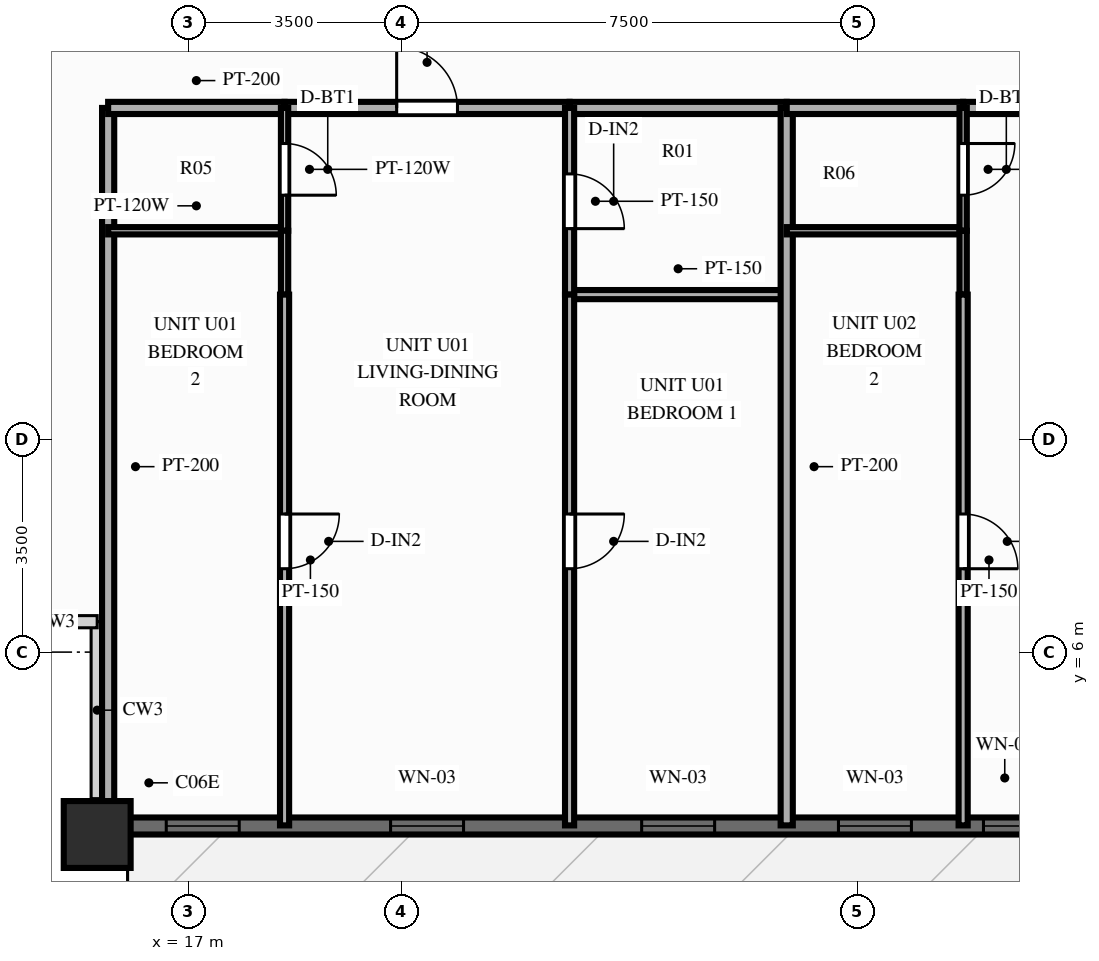
"""IFC4 building model, lengths in metres.
Left out: names, types, materials, properties, quantities, classifications, styles, units other than length and angle.
Written with IfcOpenShell. Run it as: python <this file> out.ifc"""

import sys

from ifc_helpers import new_model, si_unit, direction, frame, frame_2d, origin, origin_2d, place, context, subcontext, project, spatial, rectangle, extrude, source, transform, mapped, element, fill, save


model = new_model("IFC4")
c1 = context("Model", 3, precision=1e-05, world=origin(), true_north=direction((0.0, 1.0)))
c2 = subcontext(c1, "Body", "Model", "MODEL_VIEW")
j1 = project(units=[si_unit("LENGTHUNIT", "METRE"), si_unit("PLANEANGLEUNIT", "RADIAN")], contexts=[c1])
p1 = place(None, origin())
s1 = spatial("IfcSite", under=j1, at=p1, CompositionType="ELEMENT")
p2 = place(p1, origin())
s2 = spatial("IfcBuilding", under=s1, at=p2, CompositionType="ELEMENT")
p3 = place(p2, frame((0.0, 0.0, 43.4)))
s3 = spatial("IfcBuildingStorey", under=s2, at=p3, CompositionType="ELEMENT", Elevation=43.4)
m1 = source(origin(), c2, "Body", "SweptSolid", [
    extrude(rectangle(XDim=1.1, YDim=1.1, at=origin_2d()), origin(), (0.0, 0.0, 1.0), 3.0),
])
p4 = place(p3, frame((15.5, 3.0, 0.0), z_axis=(0.0, 0.0, 1.0), x_axis=(1.0, 0.0, 0.0)))
e1 = element("IfcColumn", 1, at=p4, inside=s3, PredefinedType="COLUMN", context=c2, shape_type="MappedRepresentation", body=[
    mapped(m1, transform((0.0, 0.0, 0.0), scale=1.0)),
])
p5 = place(p3, frame((15.5, 3.14, 0.0), z_axis=(0.0, 0.0, 1.0), x_axis=(1.0, 0.0, 0.0)))
e2 = element("IfcWall", 2, at=p5, inside=s3, PredefinedType="SOLIDWALL", context=c2, shape_type="SweptSolid", body=[
    extrude(rectangle(XDim=45.0, YDim=0.28, at=frame_2d((22.5, 0.0))), origin(), (0.0, 0.0, 1.0), 2.28),
])
p6 = place(p5, frame((1.136, 0.0, 0.25)))
e3 = element("IfcOpeningElement", 3, at=p6, cuts=e2, PredefinedType="OPENING", context=c2, shape_type="SweptSolid", body=[
    extrude(rectangle(XDim=1.2, YDim=1.5, at=frame_2d((0.6, 0.75))), frame((0.0, 0.152, 0.0), z_axis=(0.0, -1.0, 0.0), x_axis=(1.0, 0.0, 0.0)), (0.0, 0.0, 1.0), 0.304),
])
p7 = place(p5, frame((4.825, 0.0, 0.25)))
e4 = element("IfcOpeningElement", 4, at=p7, cuts=e2, PredefinedType="OPENING", context=c2, shape_type="SweptSolid", body=[
    extrude(rectangle(XDim=1.2, YDim=1.5, at=frame_2d((0.6, 0.75))), frame((0.0, 0.152, 0.0), z_axis=(0.0, -1.0, 0.0), x_axis=(1.0, 0.0, 0.0)), (0.0, 0.0, 1.0), 0.304),
])
p8 = place(p5, frame((8.954, 0.0, 0.25)))
e5 = element("IfcOpeningElement", 5, at=p8, cuts=e2, PredefinedType="OPENING", context=c2, shape_type="SweptSolid", body=[
    extrude(rectangle(XDim=1.2, YDim=1.5, at=frame_2d((0.6, 0.75))), frame((0.0, 0.152, 0.0), z_axis=(0.0, -1.0, 0.0), x_axis=(1.0, 0.0, 0.0)), (0.0, 0.0, 1.0), 0.304),
])
p9 = place(p5, frame((12.191, 0.0, 0.25)))
e6 = element("IfcOpeningElement", 6, at=p9, cuts=e2, PredefinedType="OPENING", context=c2, shape_type="SweptSolid", body=[
    extrude(rectangle(XDim=1.2, YDim=1.5, at=frame_2d((0.6, 0.75))), frame((0.0, 0.152, 0.0), z_axis=(0.0, -1.0, 0.0), x_axis=(1.0, 0.0, 0.0)), (0.0, 0.0, 1.0), 0.304),
])
p10 = place(p5, frame((14.576, 0.0, 0.25)))
e7 = element("IfcOpeningElement", 7, at=p10, cuts=e2, PredefinedType="OPENING", context=c2, shape_type="SweptSolid", body=[
    extrude(rectangle(XDim=0.7, YDim=1.5, at=frame_2d((0.35, 0.75))), frame((0.0, 0.152, 0.0), z_axis=(0.0, -1.0, 0.0), x_axis=(1.0, 0.0, 0.0)), (0.0, 0.0, 1.0), 0.304),
])
p11 = place(p5, frame((17.059, 0.0, 0.25)))
e8 = element("IfcOpeningElement", 8, at=p11, cuts=e2, PredefinedType="OPENING", context=c2, shape_type="SweptSolid", body=[
    extrude(rectangle(XDim=1.2, YDim=1.5, at=frame_2d((0.6, 0.75))), frame((0.0, 0.152, 0.0), z_axis=(0.0, -1.0, 0.0), x_axis=(1.0, 0.0, 0.0)), (0.0, 0.0, 1.0), 0.304),
])
p12 = place(p5, frame((21.264, 0.0, 0.0), z_axis=(0.0, 0.0, 1.0), x_axis=(-1.0, 0.0, 0.0)))
e9 = element("IfcOpeningElement", 9, at=p12, cuts=e2, PredefinedType="OPENING", context=c2, shape_type="SweptSolid", body=[
    extrude(rectangle(XDim=1.1, YDim=2.15, at=frame_2d((0.55, 1.075))), frame((0.0, 0.152, 0.0), z_axis=(0.0, -1.0, 0.0), x_axis=(1.0, 0.0, 0.0)), (0.0, 0.0, 1.0), 0.304),
])
p13 = place(p5, frame((23.351, 0.0, 0.25)))
e10 = element("IfcOpeningElement", 10, at=p13, cuts=e2, PredefinedType="OPENING", context=c2, shape_type="SweptSolid", body=[
    extrude(rectangle(XDim=1.2, YDim=1.5, at=frame_2d((0.6, 0.75))), frame((0.0, 0.152, 0.0), z_axis=(0.0, -1.0, 0.0), x_axis=(1.0, 0.0, 0.0)), (0.0, 0.0, 1.0), 0.304),
])
p14 = place(p5, frame((26.406, 0.0, 0.25)))
e11 = element("IfcOpeningElement", 11, at=p14, cuts=e2, PredefinedType="OPENING", context=c2, shape_type="SweptSolid", body=[
    extrude(rectangle(XDim=1.2, YDim=1.5, at=frame_2d((0.6, 0.75))), frame((0.0, 0.152, 0.0), z_axis=(0.0, -1.0, 0.0), x_axis=(1.0, 0.0, 0.0)), (0.0, 0.0, 1.0), 0.304),
])
p15 = place(p5, frame((31.39, 0.0, 0.25)))
e12 = element("IfcOpeningElement", 12, at=p15, cuts=e2, PredefinedType="OPENING", context=c2, shape_type="SweptSolid", body=[
    extrude(rectangle(XDim=1.2, YDim=1.5, at=frame_2d((0.6, 0.75))), frame((0.0, 0.152, 0.0), z_axis=(0.0, -1.0, 0.0), x_axis=(1.0, 0.0, 0.0)), (0.0, 0.0, 1.0), 0.304),
])
p16 = place(p5, frame((34.511, 0.0, 0.25)))
e13 = element("IfcOpeningElement", 13, at=p16, cuts=e2, PredefinedType="OPENING", context=c2, shape_type="SweptSolid", body=[
    extrude(rectangle(XDim=1.2, YDim=1.5, at=frame_2d((0.6, 0.75))), frame((0.0, 0.152, 0.0), z_axis=(0.0, -1.0, 0.0), x_axis=(1.0, 0.0, 0.0)), (0.0, 0.0, 1.0), 0.304),
])
p17 = place(p5, frame((38.305, 0.0, 0.25)))
e14 = element("IfcOpeningElement", 14, at=p17, cuts=e2, PredefinedType="OPENING", context=c2, shape_type="SweptSolid", body=[
    extrude(rectangle(XDim=1.2, YDim=1.5, at=frame_2d((0.6, 0.75))), frame((0.0, 0.152, 0.0), z_axis=(0.0, -1.0, 0.0), x_axis=(1.0, 0.0, 0.0)), (0.0, 0.0, 1.0), 0.304),
])
p18 = place(p5, frame((42.329, 0.0, 0.25)))
e15 = element("IfcOpeningElement", 15, at=p18, cuts=e2, PredefinedType="OPENING", context=c2, shape_type="SweptSolid", body=[
    extrude(rectangle(XDim=1.2, YDim=1.5, at=frame_2d((0.6, 0.75))), frame((0.0, 0.152, 0.0), z_axis=(0.0, -1.0, 0.0), x_axis=(1.0, 0.0, 0.0)), (0.0, 0.0, 1.0), 0.304),
])
p19 = place(p3, frame((15.68, 14.95, 0.0), z_axis=(0.0, 0.0, 1.0), x_axis=(0.0, -1.0, 0.0)))
e16 = element("IfcWall", 16, at=p19, inside=s3, PredefinedType="PARTITIONING", context=c2, shape_type="SweptSolid", body=[
    extrude(rectangle(XDim=11.8, YDim=0.2, at=frame_2d((5.9, 0.0))), origin(), (0.0, 0.0, 1.0), 2.79),
])
p20 = place(p3, frame((15.68, 14.95, 0.0), z_axis=(0.0, 0.0, 1.0), x_axis=(1.0, 0.0, 0.0)))
e17 = element("IfcWall", 17, at=p20, inside=s3, PredefinedType="PARTITIONING", context=c2, shape_type="SweptSolid", body=[
    extrude(rectangle(XDim=2.902, YDim=0.2, at=frame_2d((1.451, 0.0))), origin(), (0.0, 0.0, 1.0), 2.79),
])
p21 = place(p3, frame((18.582, 14.95, 0.0), z_axis=(0.0, 0.0, 1.0), x_axis=(1.0, 0.0, 0.0)))
e18 = element("IfcWall", 18, at=p21, inside=s3, PredefinedType="PARTITIONING", context=c2, shape_type="SweptSolid", body=[
    extrude(rectangle(XDim=4.687, YDim=0.2, at=frame_2d((2.344, 0.0))), origin(), (0.0, 0.0, 1.0), 2.79),
])
p22 = place(p21, frame((1.844, 0.0, 0.0)))
e19 = element("IfcOpeningElement", 19, at=p22, cuts=e18, PredefinedType="OPENING", context=c2, shape_type="SweptSolid", body=[
    extrude(rectangle(XDim=1.0, YDim=2.15, at=frame_2d((0.5, 1.075))), frame((0.0, 0.112, 0.0), z_axis=(0.0, -1.0, 0.0), x_axis=(1.0, 0.0, 0.0)), (0.0, 0.0, 1.0), 0.224),
])
p23 = place(p3, frame((23.269, 14.95, 0.0), z_axis=(0.0, 0.0, 1.0), x_axis=(1.0, 0.0, 0.0)))
e20 = element("IfcWall", 20, at=p23, inside=s3, PredefinedType="PARTITIONING", context=c2, shape_type="SweptSolid", body=[
    extrude(rectangle(XDim=3.571, YDim=0.2, at=frame_2d((1.786, 0.0))), origin(), (0.0, 0.0, 1.0), 2.79),
])
p24 = place(p3, frame((15.68, 12.93, 0.0), z_axis=(0.0, 0.0, 1.0), x_axis=(1.0, 0.0, 0.0)))
e21 = element("IfcWall", 21, at=p24, inside=s3, PredefinedType="PARTITIONING", context=c2, shape_type="SweptSolid", body=[
    extrude(rectangle(XDim=2.902, YDim=0.12, at=frame_2d((1.451, 0.0))), origin(), (0.0, 0.0, 1.0), 2.79),
])
p25 = place(p3, frame((23.269, 11.88, 0.0), z_axis=(0.0, 0.0, 1.0), x_axis=(1.0, 0.0, 0.0)))
e22 = element("IfcWall", 22, at=p25, inside=s3, PredefinedType="PARTITIONING", context=c2, shape_type="SweptSolid", body=[
    extrude(rectangle(XDim=3.571, YDim=0.15, at=frame_2d((1.786, 0.0))), origin(), (0.0, 0.0, 1.0), 2.79),
])
p26 = place(p3, frame((18.582, 14.95, 0.0), z_axis=(0.0, 0.0, 1.0), x_axis=(0.0, -1.0, 0.0)))
e23 = element("IfcWall", 23, at=p26, inside=s3, PredefinedType="PARTITIONING", context=c2, shape_type="SweptSolid", body=[
    extrude(rectangle(XDim=2.02, YDim=0.12, at=frame_2d((1.01, 0.0))), origin(), (0.0, 0.0, 1.0), 2.79),
])
p27 = place(p26, frame((0.585, 0.0, 0.0)))
e24 = element("IfcOpeningElement", 24, at=p27, cuts=e23, PredefinedType="OPENING", context=c2, shape_type="SweptSolid", body=[
    extrude(rectangle(XDim=0.85, YDim=2.05, at=frame_2d((0.425, 1.025))), frame((0.0, 0.072, 0.0), z_axis=(0.0, -1.0, 0.0), x_axis=(1.0, 0.0, 0.0)), (0.0, 0.0, 1.0), 0.144),
])
p28 = place(p3, frame((18.582, 12.93, 0.0), z_axis=(0.0, 0.0, 1.0), x_axis=(0.0, -1.0, 0.0)))
e25 = element("IfcWall", 25, at=p28, inside=s3, PredefinedType="PARTITIONING", context=c2, shape_type="SweptSolid", body=[
    extrude(rectangle(XDim=1.05, YDim=0.12, at=frame_2d((0.525, 0.0))), origin(), (0.0, 0.0, 1.0), 2.79),
])
p29 = place(p3, frame((18.582, 11.88, 0.0), z_axis=(0.0, 0.0, 1.0), x_axis=(0.0, -1.0, 0.0)))
e26 = element("IfcWall", 26, at=p29, inside=s3, PredefinedType="PARTITIONING", context=c2, shape_type="SweptSolid", body=[
    extrude(rectangle(XDim=8.73, YDim=0.15, at=frame_2d((4.365, 0.0))), origin(), (0.0, 0.0, 1.0), 2.79),
])
p30 = place(p29, frame((3.609, 0.0, 0.0)))
e27 = element("IfcOpeningElement", 27, at=p30, cuts=e26, PredefinedType="OPENING", context=c2, shape_type="SweptSolid", body=[
    extrude(rectangle(XDim=0.9, YDim=2.1, at=frame_2d((0.45, 1.05))), frame((0.0, 0.087, 0.0), z_axis=(0.0, -1.0, 0.0), x_axis=(1.0, 0.0, 0.0)), (0.0, 0.0, 1.0), 0.174),
])
p31 = place(p3, frame((23.269, 14.95, 0.0), z_axis=(0.0, 0.0, 1.0), x_axis=(0.0, -1.0, 0.0)))
e28 = element("IfcWall", 28, at=p31, inside=s3, PredefinedType="PARTITIONING", context=c2, shape_type="SweptSolid", body=[
    extrude(rectangle(XDim=3.07, YDim=0.15, at=frame_2d((1.535, 0.0))), origin(), (0.0, 0.0, 1.0), 2.79),
])
p32 = place(p31, frame((1.085, 0.0, 0.0)))
e29 = element("IfcOpeningElement", 29, at=p32, cuts=e28, PredefinedType="OPENING", context=c2, shape_type="SweptSolid", body=[
    extrude(rectangle(XDim=0.9, YDim=2.1, at=frame_2d((0.45, 1.05))), frame((0.0, 0.087, 0.0), z_axis=(0.0, -1.0, 0.0), x_axis=(1.0, 0.0, 0.0)), (0.0, 0.0, 1.0), 0.174),
])
p33 = place(p3, frame((23.269, 11.88, 0.0), z_axis=(0.0, 0.0, 1.0), x_axis=(0.0, -1.0, 0.0)))
e30 = element("IfcWall", 30, at=p33, inside=s3, PredefinedType="PARTITIONING", context=c2, shape_type="SweptSolid", body=[
    extrude(rectangle(XDim=8.73, YDim=0.15, at=frame_2d((4.365, 0.0))), origin(), (0.0, 0.0, 1.0), 2.79),
])
p34 = place(p33, frame((3.609, 0.0, 0.0)))
e31 = element("IfcOpeningElement", 31, at=p34, cuts=e30, PredefinedType="OPENING", context=c2, shape_type="SweptSolid", body=[
    extrude(rectangle(XDim=0.9, YDim=2.1, at=frame_2d((0.45, 1.05))), frame((0.0, 0.087, 0.0), z_axis=(0.0, -1.0, 0.0), x_axis=(1.0, 0.0, 0.0)), (0.0, 0.0, 1.0), 0.174),
])
p35 = place(p3, frame((26.84, 14.95, 0.0), z_axis=(0.0, 0.0, 1.0), x_axis=(0.0, -1.0, 0.0)))
e32 = element("IfcWall", 32, at=p35, inside=s3, PredefinedType="PARTITIONING", context=c2, shape_type="SweptSolid", body=[
    extrude(rectangle(XDim=11.8, YDim=0.2, at=frame_2d((5.9, 0.0))), origin(), (0.0, 0.0, 1.0), 2.79),
])
p36 = place(p3, frame((26.84, 14.95, 0.0), z_axis=(0.0, 0.0, 1.0), x_axis=(1.0, 0.0, 0.0)))
e33 = element("IfcWall", 33, at=p36, inside=s3, PredefinedType="PARTITIONING", context=c2, shape_type="SweptSolid", body=[
    extrude(rectangle(XDim=2.902, YDim=0.2, at=frame_2d((1.451, 0.0))), origin(), (0.0, 0.0, 1.0), 2.79),
])
p37 = place(p3, frame((29.742, 14.95, 0.0), z_axis=(0.0, 0.0, 1.0), x_axis=(1.0, 0.0, 0.0)))
e34 = element("IfcWall", 34, at=p37, inside=s3, PredefinedType="PARTITIONING", context=c2, shape_type="SweptSolid", body=[
    extrude(rectangle(XDim=4.687, YDim=0.2, at=frame_2d((2.344, 0.0))), origin(), (0.0, 0.0, 1.0), 2.79),
])
p38 = place(p37, frame((1.91, 0.0, 0.0)))
e35 = element("IfcOpeningElement", 35, at=p38, cuts=e34, PredefinedType="OPENING", context=c2, shape_type="SweptSolid", body=[
    extrude(rectangle(XDim=1.0, YDim=2.15, at=frame_2d((0.5, 1.075))), frame((0.0, 0.112, 0.0), z_axis=(0.0, -1.0, 0.0), x_axis=(1.0, 0.0, 0.0)), (0.0, 0.0, 1.0), 0.224),
])
p39 = place(p3, frame((26.84, 12.93, 0.0), z_axis=(0.0, 0.0, 1.0), x_axis=(1.0, 0.0, 0.0)))
e36 = element("IfcWall", 36, at=p39, inside=s3, PredefinedType="PARTITIONING", context=c2, shape_type="SweptSolid", body=[
    extrude(rectangle(XDim=2.902, YDim=0.12, at=frame_2d((1.451, 0.0))), origin(), (0.0, 0.0, 1.0), 2.79),
])
p40 = place(p3, frame((29.742, 14.95, 0.0), z_axis=(0.0, 0.0, 1.0), x_axis=(0.0, -1.0, 0.0)))
e37 = element("IfcWall", 37, at=p40, inside=s3, PredefinedType="PARTITIONING", context=c2, shape_type="SweptSolid", body=[
    extrude(rectangle(XDim=2.02, YDim=0.12, at=frame_2d((1.01, 0.0))), origin(), (0.0, 0.0, 1.0), 2.79),
])
p41 = place(p40, frame((0.585, 0.0, 0.0)))
e38 = element("IfcOpeningElement", 38, at=p41, cuts=e37, PredefinedType="OPENING", context=c2, shape_type="SweptSolid", body=[
    extrude(rectangle(XDim=0.85, YDim=2.05, at=frame_2d((0.425, 1.025))), frame((0.0, 0.072, 0.0), z_axis=(0.0, -1.0, 0.0), x_axis=(1.0, 0.0, 0.0)), (0.0, 0.0, 1.0), 0.144),
])
p42 = place(p3, frame((29.742, 12.93, 0.0), z_axis=(0.0, 0.0, 1.0), x_axis=(0.0, -1.0, 0.0)))
e39 = element("IfcWall", 39, at=p42, inside=s3, PredefinedType="PARTITIONING", context=c2, shape_type="SweptSolid", body=[
    extrude(rectangle(XDim=1.05, YDim=0.12, at=frame_2d((0.525, 0.0))), origin(), (0.0, 0.0, 1.0), 2.79),
])
p43 = place(p3, frame((29.742, 11.88, 0.0), z_axis=(0.0, 0.0, 1.0), x_axis=(0.0, -1.0, 0.0)))
e40 = element("IfcWall", 40, at=p43, inside=s3, PredefinedType="PARTITIONING", context=c2, shape_type="SweptSolid", body=[
    extrude(rectangle(XDim=8.73, YDim=0.15, at=frame_2d((4.365, 0.0))), origin(), (0.0, 0.0, 1.0), 2.79),
])
p44 = place(p43, frame((3.609, 0.0, 0.0)))
e41 = element("IfcOpeningElement", 41, at=p44, cuts=e40, PredefinedType="OPENING", context=c2, shape_type="SweptSolid", body=[
    extrude(rectangle(XDim=0.9, YDim=2.1, at=frame_2d((0.45, 1.05))), frame((0.0, 0.087, 0.0), z_axis=(0.0, -1.0, 0.0), x_axis=(1.0, 0.0, 0.0)), (0.0, 0.0, 1.0), 0.174),
])
m2 = source(origin(), c2, "Body", "SweptSolid", [
    extrude(rectangle(XDim=1.2, YDim=1.5, at=frame_2d((0.6, 0.75))), frame((0.0, 0.03, 0.0), z_axis=(0.0, -1.0, 0.0), x_axis=(1.0, 0.0, 0.0)), (0.0, 0.0, 1.0), 0.06),
])
p45 = place(p6, origin())
e42 = element("IfcWindow", 42, at=p45, inside=s3, PartitioningType="SINGLE_PANEL", PredefinedType="WINDOW", context=c2, shape_type="MappedRepresentation", body=[
    mapped(m2, transform((0.0, 0.0, 0.0), scale=1.0)),
])
fill(e3, e42)
p46 = place(p7, origin())
e43 = element("IfcWindow", 43, at=p46, inside=s3, PartitioningType="SINGLE_PANEL", PredefinedType="WINDOW", context=c2, shape_type="MappedRepresentation", body=[
    mapped(m2, transform((0.0, 0.0, 0.0), scale=1.0)),
])
fill(e4, e43)
p47 = place(p8, origin())
e44 = element("IfcWindow", 44, at=p47, inside=s3, PartitioningType="SINGLE_PANEL", PredefinedType="WINDOW", context=c2, shape_type="MappedRepresentation", body=[
    mapped(m2, transform((0.0, 0.0, 0.0), scale=1.0)),
])
fill(e5, e44)
p48 = place(p9, origin())
e45 = element("IfcWindow", 45, at=p48, inside=s3, PartitioningType="SINGLE_PANEL", PredefinedType="WINDOW", context=c2, shape_type="MappedRepresentation", body=[
    mapped(m2, transform((0.0, 0.0, 0.0), scale=1.0)),
])
fill(e6, e45)
m3 = source(origin(), c2, "Body", "SweptSolid", [
    extrude(rectangle(XDim=0.7, YDim=1.5, at=frame_2d((0.35, 0.75))), frame((0.0, 0.03, 0.0), z_axis=(0.0, -1.0, 0.0), x_axis=(1.0, 0.0, 0.0)), (0.0, 0.0, 1.0), 0.06),
])
p49 = place(p10, origin())
e46 = element("IfcWindow", 46, at=p49, inside=s3, PartitioningType="SINGLE_PANEL", PredefinedType="WINDOW", context=c2, shape_type="MappedRepresentation", body=[
    mapped(m3, transform((0.0, 0.0, 0.0), scale=1.0)),
])
fill(e7, e46)
m4 = source(origin(), c2, "Body", "SweptSolid", [
    extrude(rectangle(XDim=1.0, YDim=2.15, at=frame_2d((0.5, 1.075))), frame((0.0, 0.025, 0.0), z_axis=(0.0, -1.0, 0.0), x_axis=(1.0, 0.0, 0.0)), (0.0, 0.0, 1.0), 0.05),
])
p50 = place(p22, origin())
e47 = element("IfcDoor", 47, at=p50, inside=s3, OperationType="SINGLE_SWING_LEFT", PredefinedType="DOOR", context=c2, shape_type="MappedRepresentation", body=[
    mapped(m4, transform((0.0, 0.0, 0.0), scale=1.0)),
])
fill(e19, e47)
m5 = source(origin(), c2, "Body", "SweptSolid", [
    extrude(rectangle(XDim=0.85, YDim=2.05, at=frame_2d((0.425, 1.025))), frame((0.0, 0.025, 0.0), z_axis=(0.0, -1.0, 0.0), x_axis=(1.0, 0.0, 0.0)), (0.0, 0.0, 1.0), 0.05),
])
p51 = place(p27, origin())
e48 = element("IfcDoor", 48, at=p51, inside=s3, OperationType="SINGLE_SWING_RIGHT", PredefinedType="DOOR", context=c2, shape_type="MappedRepresentation", body=[
    mapped(m5, transform((0.0, 0.0, 0.0), scale=1.0)),
])
fill(e24, e48)
m6 = source(origin(), c2, "Body", "SweptSolid", [
    extrude(rectangle(XDim=0.9, YDim=2.1, at=frame_2d((0.45, 1.05))), frame((0.0, 0.025, 0.0), z_axis=(0.0, -1.0, 0.0), x_axis=(1.0, 0.0, 0.0)), (0.0, 0.0, 1.0), 0.05),
])
p52 = place(p30, origin())
e49 = element("IfcDoor", 49, at=p52, inside=s3, OperationType="SINGLE_SWING_LEFT", PredefinedType="DOOR", context=c2, shape_type="MappedRepresentation", body=[
    mapped(m6, transform((0.0, 0.0, 0.0), scale=1.0)),
])
fill(e27, e49)
p53 = place(p32, origin())
e50 = element("IfcDoor", 50, at=p53, inside=s3, OperationType="SINGLE_SWING_RIGHT", PredefinedType="DOOR", context=c2, shape_type="MappedRepresentation", body=[
    mapped(m6, transform((0.0, 0.0, 0.0), scale=1.0)),
])
fill(e29, e50)
p54 = place(p34, origin())
e51 = element("IfcDoor", 51, at=p54, inside=s3, OperationType="SINGLE_SWING_LEFT", PredefinedType="DOOR", context=c2, shape_type="MappedRepresentation", body=[
    mapped(m6, transform((0.0, 0.0, 0.0), scale=1.0)),
])
fill(e31, e51)
p55 = place(p41, origin())
e52 = element("IfcDoor", 52, at=p55, inside=s3, OperationType="SINGLE_SWING_LEFT", PredefinedType="DOOR", context=c2, shape_type="MappedRepresentation", body=[
    mapped(m5, transform((0.0, 0.0, 0.0), scale=1.0)),
])
fill(e38, e52)
p56 = place(p44, origin())
e53 = element("IfcDoor", 53, at=p56, inside=s3, OperationType="SINGLE_SWING_RIGHT", PredefinedType="DOOR", context=c2, shape_type="MappedRepresentation", body=[
    mapped(m6, transform((0.0, 0.0, 0.0), scale=1.0)),
])
fill(e41, e53)
save(model, sys.argv[1])
